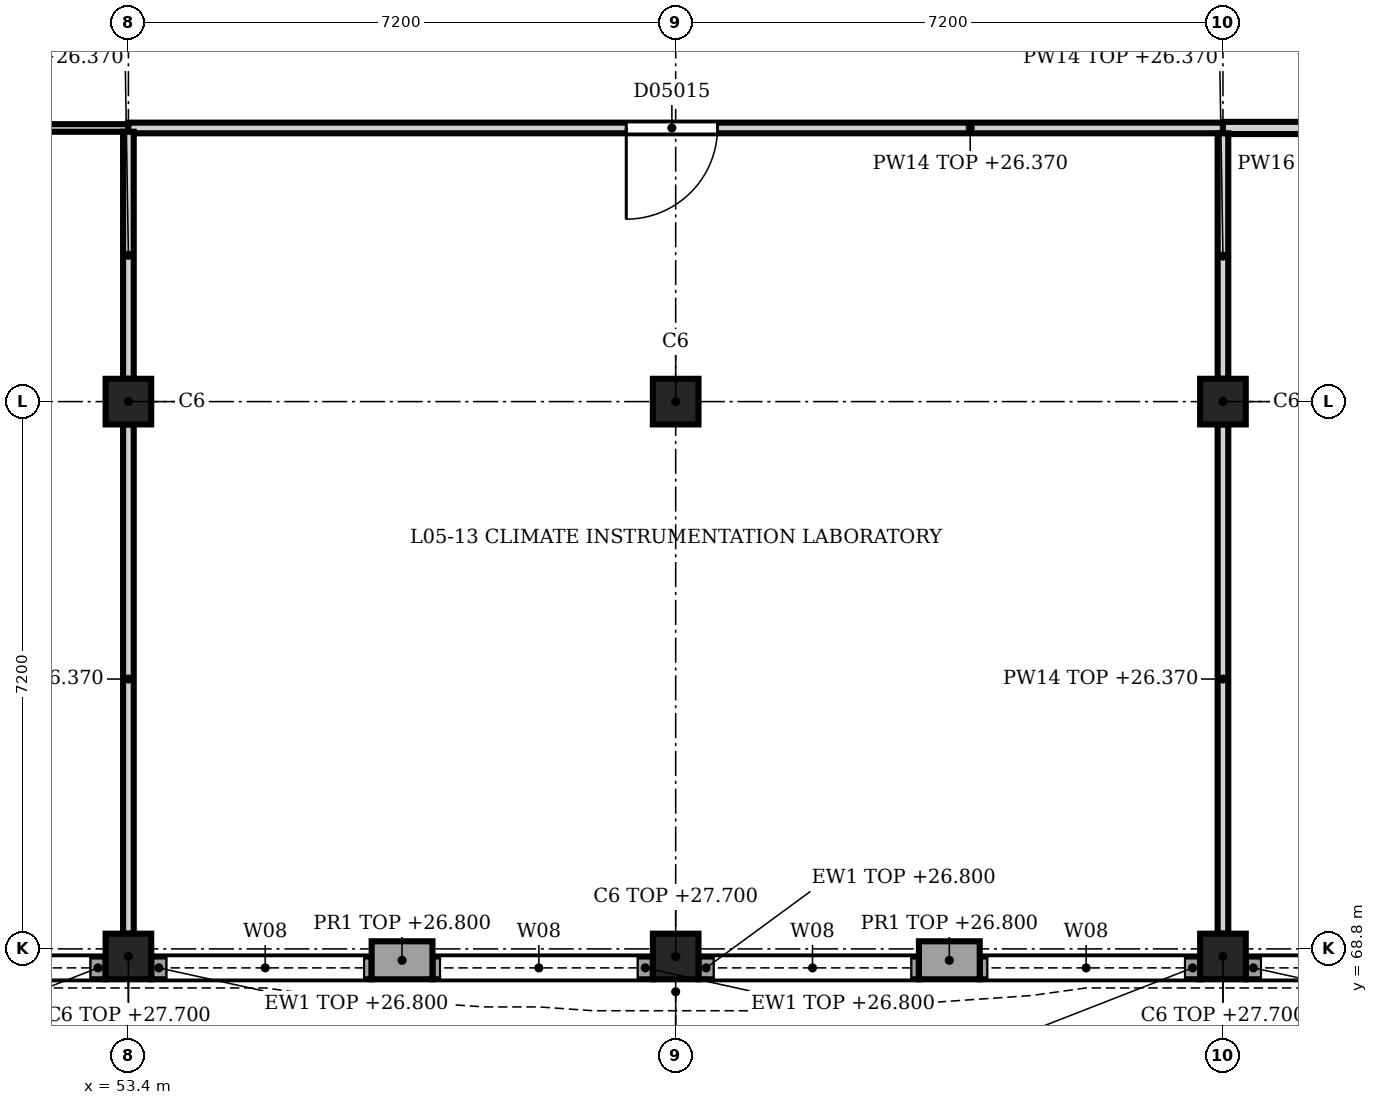
"""IFC4 building model, lengths in metres.
Left out: names, types, materials, properties, quantities, classifications, styles, units other than length and angle.
Written with IfcOpenShell. Run it as: python <this file> out.ifc"""

import sys

from ifc_helpers import new_model, si_unit, direction, frame, frame_2d, origin, origin_2d, place, context, subcontext, project, spatial, rectangle, extrude, element, fill, save


model = new_model("IFC4")
c1 = context("Model", 3, precision=1e-05, world=origin(), true_north=direction((0.0, 1.0)))
c2 = subcontext(c1, "Body", "Model", "MODEL_VIEW")
j1 = project(units=[si_unit("LENGTHUNIT", "METRE"), si_unit("PLANEANGLEUNIT", "RADIAN")], contexts=[c1])
p1 = place(None, origin())
s1 = spatial("IfcSite", under=j1, at=p1, CompositionType="ELEMENT")
p2 = place(p1, origin())
s2 = spatial("IfcBuilding", under=s1, at=p2, CompositionType="ELEMENT")
p3 = place(p2, frame((0.0, 0.0, 23.4)))
s3 = spatial("IfcBuildingStorey", under=s2, at=p3, CompositionType="ELEMENT", Elevation=23.4)
p4 = place(p3, frame((53.4, 68.7, 0.0), z_axis=(0.0, 0.0, 1.0), x_axis=(1.0, 0.0, 0.0)))
e1 = element("IfcColumn", 1, at=p4, inside=s3, PredefinedType="COLUMN", context=c2, shape_type="SweptSolid", body=[
    extrude(rectangle(XDim=0.6, YDim=0.6, at=origin_2d()), origin(), (0.0, 0.0, 1.0), 4.3),
])
p5 = place(p3, frame((53.4, 76.0, 0.0), z_axis=(0.0, 0.0, 1.0), x_axis=(1.0, 0.0, 0.0)))
e2 = element("IfcColumn", 2, at=p5, inside=s3, PredefinedType="COLUMN", context=c2, shape_type="SweptSolid", body=[
    extrude(rectangle(XDim=0.6, YDim=0.6, at=origin_2d()), origin(), (0.0, 0.0, 1.0), 4.5),
])
p6 = place(p3, frame((60.6, 68.7, 0.0), z_axis=(0.0, 0.0, 1.0), x_axis=(1.0, 0.0, 0.0)))
e3 = element("IfcColumn", 3, at=p6, inside=s3, PredefinedType="COLUMN", context=c2, shape_type="SweptSolid", body=[
    extrude(rectangle(XDim=0.6, YDim=0.6, at=origin_2d()), origin(), (0.0, 0.0, 1.0), 4.3),
])
p7 = place(p3, frame((60.6, 76.0, 0.0), z_axis=(0.0, 0.0, 1.0), x_axis=(1.0, 0.0, 0.0)))
e4 = element("IfcColumn", 4, at=p7, inside=s3, PredefinedType="COLUMN", context=c2, shape_type="SweptSolid", body=[
    extrude(rectangle(XDim=0.6, YDim=0.6, at=origin_2d()), origin(), (0.0, 0.0, 1.0), 4.5),
])
p8 = place(p3, frame((67.8, 68.7, 0.0), z_axis=(0.0, 0.0, 1.0), x_axis=(1.0, 0.0, 0.0)))
e5 = element("IfcColumn", 5, at=p8, inside=s3, PredefinedType="COLUMN", context=c2, shape_type="SweptSolid", body=[
    extrude(rectangle(XDim=0.6, YDim=0.6, at=origin_2d()), origin(), (0.0, 0.0, 1.0), 4.3),
])
p9 = place(p3, frame((67.8, 76.0, 0.0), z_axis=(0.0, 0.0, 1.0), x_axis=(1.0, 0.0, 0.0)))
e6 = element("IfcColumn", 6, at=p9, inside=s3, PredefinedType="COLUMN", context=c2, shape_type="SweptSolid", body=[
    extrude(rectangle(XDim=0.6, YDim=0.6, at=origin_2d()), origin(), (0.0, 0.0, 1.0), 4.5),
])
p10 = place(p3, frame((64.6, 68.65, 0.0), z_axis=(0.0, 0.0, 1.0), x_axis=(-1.0, 0.0, 0.0)))
e7 = element("IfcWall", 7, at=p10, inside=s3, PredefinedType="SOLIDWALL", context=c2, shape_type="SweptSolid", body=[
    extrude(rectangle(XDim=0.8, YDim=0.5, at=frame_2d((0.4, 0.0))), origin(), (0.0, 0.0, 1.0), 3.4),
])
p11 = place(p3, frame((57.4, 68.65, 0.0), z_axis=(0.0, 0.0, 1.0), x_axis=(-1.0, 0.0, 0.0)))
e8 = element("IfcWall", 8, at=p11, inside=s3, PredefinedType="SOLIDWALL", context=c2, shape_type="SweptSolid", body=[
    extrude(rectangle(XDim=0.8, YDim=0.5, at=frame_2d((0.4, 0.0))), origin(), (0.0, 0.0, 1.0), 3.4),
])
p12 = place(p3, frame((71.0, 68.55, 0.0), z_axis=(0.0, 0.0, 1.0), x_axis=(-1.0, 0.0, 0.0)))
e9 = element("IfcWall", 9, at=p12, inside=s3, PredefinedType="SOLIDWALL", context=c2, shape_type="SweptSolid", body=[
    extrude(rectangle(XDim=2.9, YDim=0.3, at=frame_2d((1.45, 0.0))), origin(), (0.0, 0.0, 1.0), 3.4),
])
p13 = place(p12, frame((0.1, 0.0, 1.2)))
e10 = element("IfcOpeningElement", 10, at=p13, cuts=e9, PredefinedType="OPENING", context=c2, shape_type="SweptSolid", body=[
    extrude(rectangle(XDim=2.6, YDim=2.1, at=frame_2d((1.3, 1.05))), frame((0.0, 0.16, 0.0), z_axis=(0.0, -1.0, 0.0), x_axis=(1.0, 0.0, 0.0)), (0.0, 0.0, 1.0), 0.32),
])
p14 = place(p3, frame((67.5, 68.55, 0.0), z_axis=(0.0, 0.0, 1.0), x_axis=(-1.0, 0.0, 0.0)))
e11 = element("IfcWall", 11, at=p14, inside=s3, PredefinedType="SOLIDWALL", context=c2, shape_type="SweptSolid", body=[
    extrude(rectangle(XDim=2.9, YDim=0.3, at=frame_2d((1.45, 0.0))), origin(), (0.0, 0.0, 1.0), 3.4),
])
p15 = place(p14, frame((0.2, 0.0, 1.2)))
e12 = element("IfcOpeningElement", 12, at=p15, cuts=e11, PredefinedType="OPENING", context=c2, shape_type="SweptSolid", body=[
    extrude(rectangle(XDim=2.6, YDim=2.1, at=frame_2d((1.3, 1.05))), frame((0.0, 0.16, 0.0), z_axis=(0.0, -1.0, 0.0), x_axis=(1.0, 0.0, 0.0)), (0.0, 0.0, 1.0), 0.32),
])
p16 = place(p3, frame((63.8, 68.55, 0.0), z_axis=(0.0, 0.0, 1.0), x_axis=(-1.0, 0.0, 0.0)))
e13 = element("IfcWall", 13, at=p16, inside=s3, PredefinedType="SOLIDWALL", context=c2, shape_type="SweptSolid", body=[
    extrude(rectangle(XDim=2.9, YDim=0.3, at=frame_2d((1.45, 0.0))), origin(), (0.0, 0.0, 1.0), 3.4),
])
p17 = place(p16, frame((0.1, 0.0, 1.2)))
e14 = element("IfcOpeningElement", 14, at=p17, cuts=e13, PredefinedType="OPENING", context=c2, shape_type="SweptSolid", body=[
    extrude(rectangle(XDim=2.6, YDim=2.1, at=frame_2d((1.3, 1.05))), frame((0.0, 0.16, 0.0), z_axis=(0.0, -1.0, 0.0), x_axis=(1.0, 0.0, 0.0)), (0.0, 0.0, 1.0), 0.32),
])
p18 = place(p3, frame((60.3, 68.55, 0.0), z_axis=(0.0, 0.0, 1.0), x_axis=(-1.0, 0.0, 0.0)))
e15 = element("IfcWall", 15, at=p18, inside=s3, PredefinedType="SOLIDWALL", context=c2, shape_type="SweptSolid", body=[
    extrude(rectangle(XDim=2.9, YDim=0.3, at=frame_2d((1.45, 0.0))), origin(), (0.0, 0.0, 1.0), 3.4),
])
p19 = place(p18, frame((0.2, 0.0, 1.2)))
e16 = element("IfcOpeningElement", 16, at=p19, cuts=e15, PredefinedType="OPENING", context=c2, shape_type="SweptSolid", body=[
    extrude(rectangle(XDim=2.6, YDim=2.1, at=frame_2d((1.3, 1.05))), frame((0.0, 0.16, 0.0), z_axis=(0.0, -1.0, 0.0), x_axis=(1.0, 0.0, 0.0)), (0.0, 0.0, 1.0), 0.32),
])
p20 = place(p3, frame((56.6, 68.55, 0.0), z_axis=(0.0, 0.0, 1.0), x_axis=(-1.0, 0.0, 0.0)))
e17 = element("IfcWall", 17, at=p20, inside=s3, PredefinedType="SOLIDWALL", context=c2, shape_type="SweptSolid", body=[
    extrude(rectangle(XDim=2.9, YDim=0.3, at=frame_2d((1.45, 0.0))), origin(), (0.0, 0.0, 1.0), 3.4),
])
p21 = place(p20, frame((0.1, 0.0, 1.2)))
e18 = element("IfcOpeningElement", 18, at=p21, cuts=e17, PredefinedType="OPENING", context=c2, shape_type="SweptSolid", body=[
    extrude(rectangle(XDim=2.6, YDim=2.1, at=frame_2d((1.3, 1.05))), frame((0.0, 0.16, 0.0), z_axis=(0.0, -1.0, 0.0), x_axis=(1.0, 0.0, 0.0)), (0.0, 0.0, 1.0), 0.32),
])
p22 = place(p3, frame((53.1, 68.55, 0.0), z_axis=(0.0, 0.0, 1.0), x_axis=(-1.0, 0.0, 0.0)))
e19 = element("IfcWall", 19, at=p22, inside=s3, PredefinedType="SOLIDWALL", context=c2, shape_type="SweptSolid", body=[
    extrude(rectangle(XDim=2.9, YDim=0.3, at=frame_2d((1.45, 0.0))), origin(), (0.0, 0.0, 1.0), 3.4),
])
p23 = place(p22, frame((0.2, 0.0, 1.2)))
e20 = element("IfcOpeningElement", 20, at=p23, cuts=e19, PredefinedType="OPENING", context=c2, shape_type="SweptSolid", body=[
    extrude(rectangle(XDim=2.6, YDim=2.1, at=frame_2d((1.3, 1.05))), frame((0.0, 0.16, 0.0), z_axis=(0.0, -1.0, 0.0), x_axis=(1.0, 0.0, 0.0)), (0.0, 0.0, 1.0), 0.32),
])
p24 = place(p3, frame((53.4, 79.6, 0.0), z_axis=(0.0, 0.0, 1.0), x_axis=(-1.0, 0.0, 0.0)))
e21 = element("IfcWall", 21, at=p24, inside=s3, PredefinedType="PARTITIONING", context=c2, shape_type="SweptSolid", body=[
    extrude(rectangle(XDim=14.4, YDim=0.1, at=frame_2d((7.2, 0.0))), origin(), (0.0, 0.0, 1.0), 2.97),
])
p25 = place(p24, frame((6.75, 0.0, 0.0)))
e22 = element("IfcOpeningElement", 22, at=p25, cuts=e21, PredefinedType="OPENING", context=c2, shape_type="SweptSolid", body=[
    extrude(rectangle(XDim=1.0, YDim=2.1, at=frame_2d((0.5, 1.05))), frame((0.0, 0.06, 0.0), z_axis=(0.0, -1.0, 0.0), x_axis=(1.0, 0.0, 0.0)), (0.0, 0.0, 1.0), 0.12),
])
p26 = place(p3, frame((67.8, 79.6, 0.0), z_axis=(0.0, 0.0, 1.0), x_axis=(-1.0, 0.0, 0.0)))
e23 = element("IfcWall", 23, at=p26, inside=s3, PredefinedType="PARTITIONING", context=c2, shape_type="SweptSolid", body=[
    extrude(rectangle(XDim=14.4, YDim=0.14, at=frame_2d((7.2, 0.0))), origin(), (0.0, 0.0, 1.0), 2.97),
])
p27 = place(p26, frame((6.65, 0.0, 0.0)))
e24 = element("IfcOpeningElement", 24, at=p27, cuts=e23, PredefinedType="OPENING", context=c2, shape_type="SweptSolid", body=[
    extrude(rectangle(XDim=1.2, YDim=2.1, at=frame_2d((0.6, 1.05))), frame((0.0, 0.08, 0.0), z_axis=(0.0, -1.0, 0.0), x_axis=(1.0, 0.0, 0.0)), (0.0, 0.0, 1.0), 0.16),
])
p28 = place(p3, frame((75.0, 79.6, 0.0), z_axis=(0.0, 0.0, 1.0), x_axis=(-1.0, 0.0, 0.0)))
e25 = element("IfcWall", 25, at=p28, inside=s3, PredefinedType="PARTITIONING", context=c2, shape_type="SweptSolid", body=[
    extrude(rectangle(XDim=7.2, YDim=0.16, at=frame_2d((3.6, 0.0))), origin(), (0.0, 0.0, 1.0), 4.3),
])
p29 = place(p28, frame((2.95, 0.0, 0.0)))
e26 = element("IfcOpeningElement", 26, at=p29, cuts=e25, PredefinedType="OPENING", context=c2, shape_type="SweptSolid", body=[
    extrude(rectangle(XDim=1.3, YDim=2.2, at=frame_2d((0.65, 1.1))), frame((0.0, 0.09, 0.0), z_axis=(0.0, -1.0, 0.0), x_axis=(1.0, 0.0, 0.0)), (0.0, 0.0, 1.0), 0.18),
])
p30 = place(p3, frame((53.4, 69.0, 0.0), z_axis=(0.0, 0.0, 1.0), x_axis=(0.0, 1.0, 0.0)))
e27 = element("IfcWall", 27, at=p30, inside=s3, PredefinedType="PARTITIONING", context=c2, shape_type="SweptSolid", body=[
    extrude(rectangle(XDim=6.7, YDim=0.14, at=frame_2d((3.35, 0.0))), origin(), (0.0, 0.0, 1.0), 2.97),
])
p31 = place(p3, frame((53.4, 76.3, 0.0), z_axis=(0.0, 0.0, 1.0), x_axis=(0.0, 1.0, 0.0)))
e28 = element("IfcWall", 28, at=p31, inside=s3, PredefinedType="PARTITIONING", context=c2, shape_type="SweptSolid", body=[
    extrude(rectangle(XDim=3.25, YDim=0.14, at=frame_2d((1.625, 0.0))), origin(), (0.0, 0.0, 1.0), 2.97),
])
p32 = place(p3, frame((67.8, 69.0, 0.0), z_axis=(0.0, 0.0, 1.0), x_axis=(0.0, 1.0, 0.0)))
e29 = element("IfcWall", 29, at=p32, inside=s3, PredefinedType="PARTITIONING", context=c2, shape_type="SweptSolid", body=[
    extrude(rectangle(XDim=6.7, YDim=0.14, at=frame_2d((3.35, 0.0))), origin(), (0.0, 0.0, 1.0), 2.97),
])
p33 = place(p3, frame((67.8, 76.3, 0.0), z_axis=(0.0, 0.0, 1.0), x_axis=(0.0, 1.0, 0.0)))
e30 = element("IfcWall", 30, at=p33, inside=s3, PredefinedType="PARTITIONING", context=c2, shape_type="SweptSolid", body=[
    extrude(rectangle(XDim=3.23, YDim=0.14, at=frame_2d((1.615, 0.0))), origin(), (0.0, 0.0, 1.0), 2.97),
])
p34 = place(p13, origin())
e31 = element("IfcWindow", 31, at=p34, inside=s3, PartitioningType="SINGLE_PANEL", PredefinedType="WINDOW", context=c2, shape_type="SweptSolid", body=[
    extrude(rectangle(XDim=2.6, YDim=2.1, at=frame_2d((1.3, 1.05))), frame((0.0, 0.03, 0.0), z_axis=(0.0, -1.0, 0.0), x_axis=(1.0, 0.0, 0.0)), (0.0, 0.0, 1.0), 0.06),
])
fill(e10, e31)
p35 = place(p15, origin())
e32 = element("IfcWindow", 32, at=p35, inside=s3, PartitioningType="SINGLE_PANEL", PredefinedType="WINDOW", context=c2, shape_type="SweptSolid", body=[
    extrude(rectangle(XDim=2.6, YDim=2.1, at=frame_2d((1.3, 1.05))), frame((0.0, 0.03, 0.0), z_axis=(0.0, -1.0, 0.0), x_axis=(1.0, 0.0, 0.0)), (0.0, 0.0, 1.0), 0.06),
])
fill(e12, e32)
p36 = place(p17, origin())
e33 = element("IfcWindow", 33, at=p36, inside=s3, PartitioningType="SINGLE_PANEL", PredefinedType="WINDOW", context=c2, shape_type="SweptSolid", body=[
    extrude(rectangle(XDim=2.6, YDim=2.1, at=frame_2d((1.3, 1.05))), frame((0.0, 0.03, 0.0), z_axis=(0.0, -1.0, 0.0), x_axis=(1.0, 0.0, 0.0)), (0.0, 0.0, 1.0), 0.06),
])
fill(e14, e33)
p37 = place(p19, origin())
e34 = element("IfcWindow", 34, at=p37, inside=s3, PartitioningType="SINGLE_PANEL", PredefinedType="WINDOW", context=c2, shape_type="SweptSolid", body=[
    extrude(rectangle(XDim=2.6, YDim=2.1, at=frame_2d((1.3, 1.05))), frame((0.0, 0.03, 0.0), z_axis=(0.0, -1.0, 0.0), x_axis=(1.0, 0.0, 0.0)), (0.0, 0.0, 1.0), 0.06),
])
fill(e16, e34)
p38 = place(p21, origin())
e35 = element("IfcWindow", 35, at=p38, inside=s3, PartitioningType="SINGLE_PANEL", PredefinedType="WINDOW", context=c2, shape_type="SweptSolid", body=[
    extrude(rectangle(XDim=2.6, YDim=2.1, at=frame_2d((1.3, 1.05))), frame((0.0, 0.03, 0.0), z_axis=(0.0, -1.0, 0.0), x_axis=(1.0, 0.0, 0.0)), (0.0, 0.0, 1.0), 0.06),
])
fill(e18, e35)
p39 = place(p23, origin())
e36 = element("IfcWindow", 36, at=p39, inside=s3, PartitioningType="SINGLE_PANEL", PredefinedType="WINDOW", context=c2, shape_type="SweptSolid", body=[
    extrude(rectangle(XDim=2.6, YDim=2.1, at=frame_2d((1.3, 1.05))), frame((0.0, 0.03, 0.0), z_axis=(0.0, -1.0, 0.0), x_axis=(1.0, 0.0, 0.0)), (0.0, 0.0, 1.0), 0.06),
])
fill(e20, e36)
p40 = place(p27, origin())
e37 = element("IfcDoor", 37, at=p40, inside=s3, OperationType="SINGLE_SWING_RIGHT", PredefinedType="DOOR", context=c2, shape_type="SweptSolid", body=[
    extrude(rectangle(XDim=1.2, YDim=2.1, at=frame_2d((0.6, 1.05))), frame((0.0, 0.025, 0.0), z_axis=(0.0, -1.0, 0.0), x_axis=(1.0, 0.0, 0.0)), (0.0, 0.0, 1.0), 0.05),
])
fill(e24, e37)
save(model, sys.argv[1])
